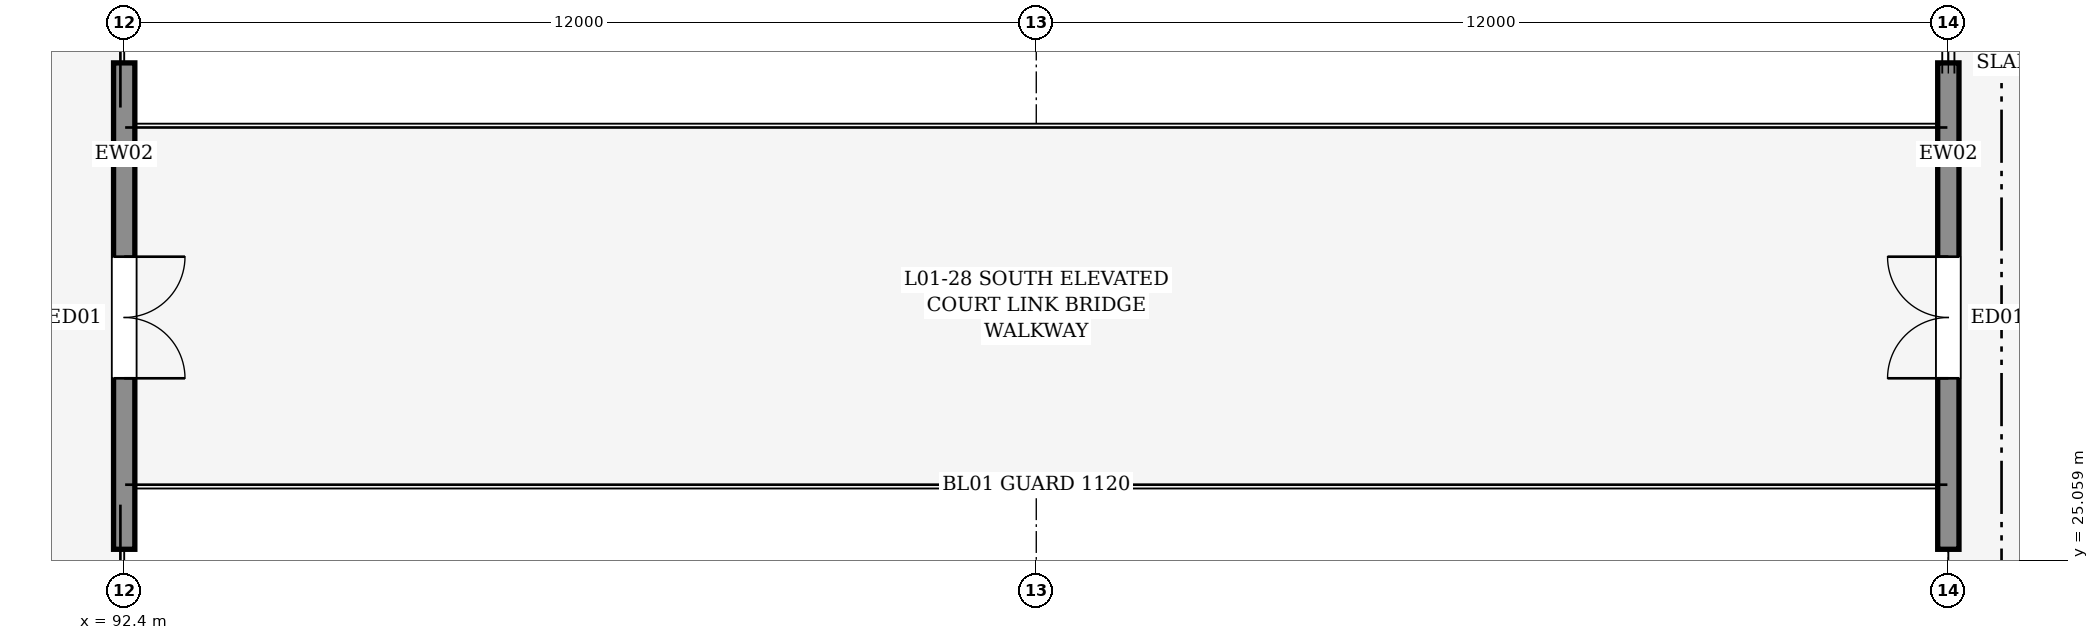
"""IFC4 building model, lengths in metres.
Left out: names, types, materials, properties, quantities, classifications, styles, units other than length and angle.
Written with IfcOpenShell. Run it as: python <this file> out.ifc"""

import sys

from ifc_helpers import new_model, si_unit, direction, frame, frame_2d, origin, place, context, subcontext, project, spatial, rectangle, extrude, element, fill, save


model = new_model("IFC4")
c1 = context("Model", 3, precision=1e-05, world=origin(), true_north=direction((0.0, 1.0)))
c2 = subcontext(c1, "Body", "Model", "MODEL_VIEW")
j1 = project(units=[si_unit("LENGTHUNIT", "METRE"), si_unit("PLANEANGLEUNIT", "RADIAN")], contexts=[c1])
p1 = place(None, origin())
s1 = spatial("IfcSite", under=j1, at=p1, CompositionType="ELEMENT")
p2 = place(p1, origin())
s2 = spatial("IfcBuilding", under=s1, at=p2, CompositionType="ELEMENT")
p3 = place(p2, frame((0.0, 0.0, 5.4)))
s3 = spatial("IfcBuildingStorey", under=s2, at=p3, CompositionType="ELEMENT", Elevation=5.4)
p4 = place(p3, frame((92.4, 25.2, 0.0), z_axis=(0.0, 0.0, 1.0), x_axis=(0.0, 1.0, 0.0)))
e1 = element("IfcWall", 1, at=p4, inside=s3, PredefinedType="STANDARD", context=c2, shape_type="SweptSolid", body=[
    extrude(rectangle(XDim=6.4, YDim=0.28, at=frame_2d((3.2, 0.0))), origin(), (0.0, 0.0, 1.0), 2.535),
])
p5 = place(p4, frame((2.25, 0.0, 0.0)))
e2 = element("IfcOpeningElement", 2, at=p5, cuts=e1, PredefinedType="OPENING", context=c2, shape_type="SweptSolid", body=[
    extrude(rectangle(XDim=1.6, YDim=2.2, at=frame_2d((0.8, 1.1))), frame((0.0, 0.15, 0.0), z_axis=(0.0, -1.0, 0.0), x_axis=(1.0, 0.0, 0.0)), (0.0, 0.0, 1.0), 0.3),
])
p6 = place(p3, frame((116.4, 25.2, 0.0), z_axis=(0.0, 0.0, 1.0), x_axis=(0.0, 1.0, 0.0)))
e3 = element("IfcWall", 3, at=p6, inside=s3, PredefinedType="STANDARD", context=c2, shape_type="SweptSolid", body=[
    extrude(rectangle(XDim=6.4, YDim=0.28, at=frame_2d((3.2, 0.0))), origin(), (0.0, 0.0, 1.0), 2.535),
])
p7 = place(p6, frame((2.25, 0.0, 0.0)))
e4 = element("IfcOpeningElement", 4, at=p7, cuts=e3, PredefinedType="OPENING", context=c2, shape_type="SweptSolid", body=[
    extrude(rectangle(XDim=1.6, YDim=2.2, at=frame_2d((0.8, 1.1))), frame((0.0, 0.15, 0.0), z_axis=(0.0, -1.0, 0.0), x_axis=(1.0, 0.0, 0.0)), (0.0, 0.0, 1.0), 0.3),
])
p8 = place(p5, frame((1.6, 0.0, 0.0), z_axis=(0.0, 0.0, 1.0), x_axis=(-1.0, 0.0, 0.0)))
e5 = element("IfcDoor", 5, at=p8, inside=s3, OperationType="DOUBLE_DOOR_SINGLE_SWING", PredefinedType="DOOR", context=c2, shape_type="SweptSolid", body=[
    extrude(rectangle(XDim=1.6, YDim=2.2, at=frame_2d((0.8, 1.1))), frame((0.0, 0.025, 0.0), z_axis=(0.0, -1.0, 0.0), x_axis=(1.0, 0.0, 0.0)), (0.0, 0.0, 1.0), 0.05),
])
fill(e2, e5)
p9 = place(p7, origin())
e6 = element("IfcDoor", 6, at=p9, inside=s3, OperationType="DOUBLE_DOOR_SINGLE_SWING", PredefinedType="DOOR", context=c2, shape_type="SweptSolid", body=[
    extrude(rectangle(XDim=1.6, YDim=2.2, at=frame_2d((0.8, 1.1))), frame((0.0, 0.025, 0.0), z_axis=(0.0, -1.0, 0.0), x_axis=(1.0, 0.0, 0.0)), (0.0, 0.0, 1.0), 0.05),
])
fill(e4, e6)
save(model, sys.argv[1])
